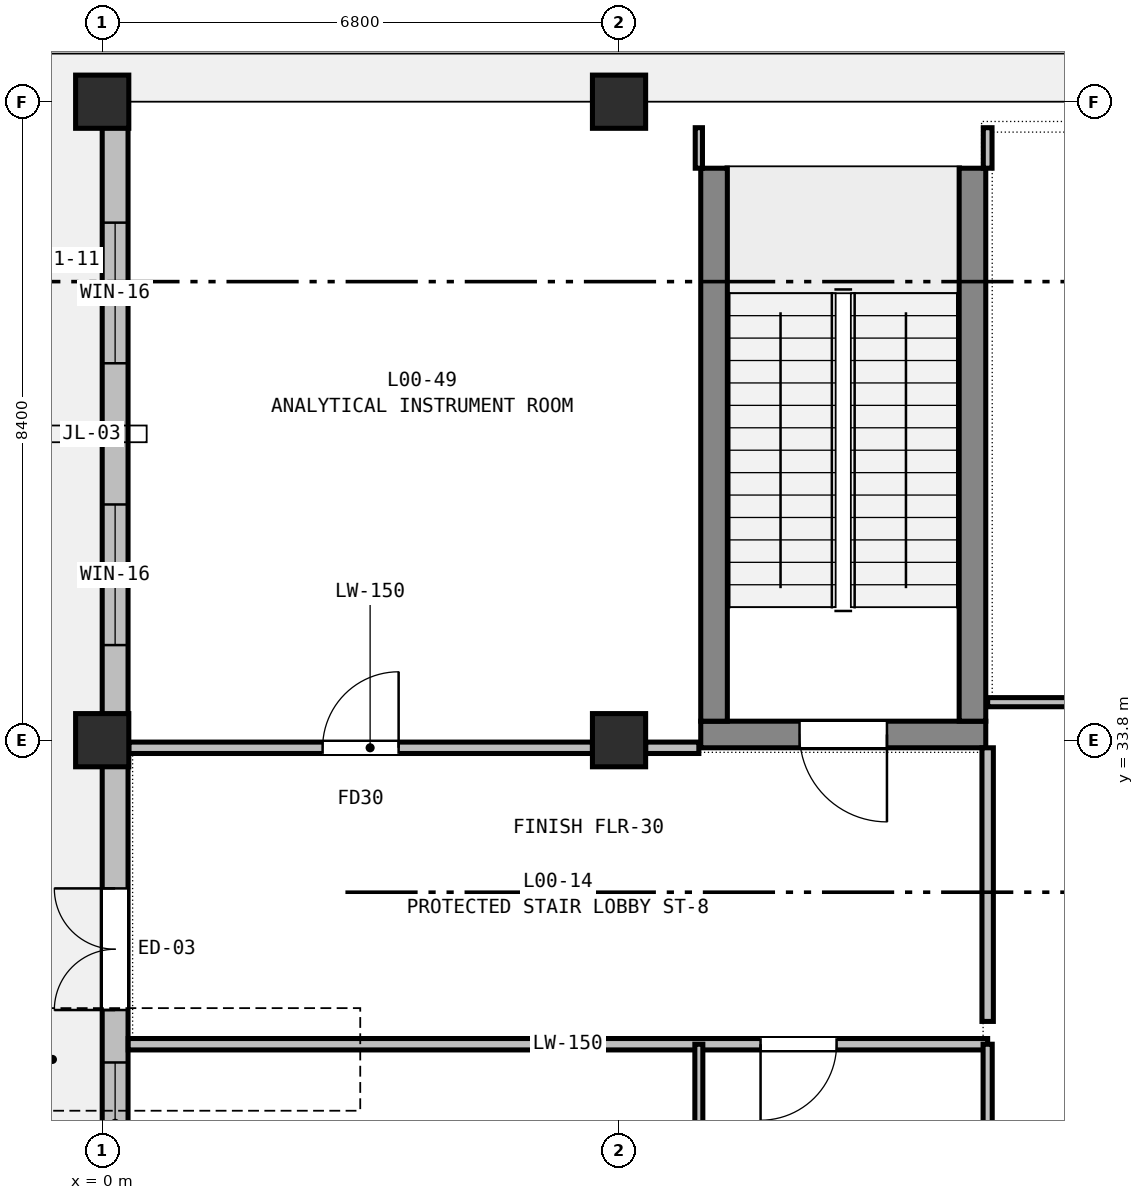
"""IFC4 building model, lengths in metres.
Left out: names, types, materials, properties, quantities, classifications, styles, units other than length and angle.
Written with IfcOpenShell. Run it as: python <this file> out.ifc"""

import sys

from ifc_helpers import new_model, si_unit, direction, frame, frame_2d, origin, origin_2d, place, context, subcontext, project, spatial, rectangle, extrude, element, fill, save


model = new_model("IFC4")
c1 = context("Model", 3, precision=1e-05, world=origin(), true_north=direction((0.0, 1.0)))
c2 = subcontext(c1, "Body", "Model", "MODEL_VIEW")
j1 = project(units=[si_unit("LENGTHUNIT", "METRE"), si_unit("PLANEANGLEUNIT", "RADIAN")], contexts=[c1])
p1 = place(None, origin())
s1 = spatial("IfcSite", under=j1, at=p1, CompositionType="ELEMENT")
p2 = place(p1, origin())
s2 = spatial("IfcBuilding", under=s1, at=p2, CompositionType="ELEMENT")
p3 = place(p2, origin())
s3 = spatial("IfcBuildingStorey", under=s2, at=p3, CompositionType="ELEMENT", Elevation=0.0)
for number, where, z_axis, x_axis in (
    (1, (0.0, 33.8, -0.32), (0.0, 0.0, 1.0), (1.0, 0.0, 0.0)),
    (2, (0.0, 42.2, -0.32), (0.0, 0.0, 1.0), (1.0, 0.0, 0.0)),
    (3, (6.8, 33.8, -0.32), (0.0, 0.0, 1.0), (1.0, 0.0, 0.0)),
    (4, (6.8, 42.2, -0.32), (0.0, 0.0, 1.0), (1.0, 0.0, 0.0)),
):
    element("IfcColumn", number, at=place(p3, frame(where, z_axis=z_axis, x_axis=x_axis)), inside=s3, PredefinedType="COLUMN", context=c2, shape_type="SweptSolid", body=[
        extrude(rectangle(XDim=0.7, YDim=0.7, at=origin_2d()), origin(), (0.0, 0.0, 1.0), 5.72),
    ])
p4 = place(p3, frame((11.625, 33.875, -0.32), z_axis=(0.0, 0.0, 1.0), x_axis=(-1.0, 0.0, 0.0)))
e5 = element("IfcWall", 5, at=p4, inside=s3, PredefinedType="SHEAR", context=c2, shape_type="SweptSolid", body=[
    extrude(rectangle(XDim=3.75, YDim=0.35, at=frame_2d((1.875, 0.0))), origin(), (0.0, 0.0, 1.0), 5.72),
])
p5 = place(p4, frame((1.3, 0.0, 0.32)))
e6 = element("IfcOpeningElement", 6, at=p5, cuts=e5, PredefinedType="OPENING", context=c2, shape_type="SweptSolid", body=[
    extrude(rectangle(XDim=1.15, YDim=2.15, at=frame_2d((0.575, 1.075))), frame((0.0, 0.185, 0.0), z_axis=(0.0, -1.0, 0.0), x_axis=(1.0, 0.0, 0.0)), (0.0, 0.0, 1.0), 0.37),
])
p6 = place(p3, frame((7.875, 41.5, -0.32), z_axis=(0.0, 0.0, 1.0), x_axis=(1.0, 0.0, 0.0)))
e7 = element("IfcWall", 7, at=p6, inside=s3, PredefinedType="SHEAR", context=c2, shape_type="SweptSolid", body=[
    extrude(rectangle(XDim=3.75, YDim=0.35, at=frame_2d((1.875, 0.0))), origin(), (0.0, 0.0, 1.0), 5.72),
])
for number, where, z_axis, x_axis in (
    (8, (8.05, 34.05, -0.32), (0.0, 0.0, 1.0), (0.0, 1.0, 0.0)),
    (9, (11.45, 34.05, -0.32), (0.0, 0.0, 1.0), (0.0, 1.0, 0.0)),
):
    element("IfcWall", number, at=place(p3, frame(where, z_axis=z_axis, x_axis=x_axis)), inside=s3, PredefinedType="SHEAR", context=c2, shape_type="SweptSolid", body=[
        extrude(rectangle(XDim=7.275, YDim=0.35, at=frame_2d((3.637, 0.0))), origin(), (0.0, 0.0, 1.0), 5.72),
    ])
p7 = place(p3, frame((0.17, 25.4, 0.0), z_axis=(0.0, 0.0, 1.0), x_axis=(0.0, 1.0, 0.0)))
e10 = element("IfcWall", 10, at=p7, inside=s3, PredefinedType="STANDARD", context=c2, shape_type="SweptSolid", body=[
    extrude(rectangle(XDim=8.4, YDim=0.34, at=frame_2d((4.2, 0.0))), origin(), (0.0, 0.0, 1.0), 4.685),
])
p8 = place(p7, frame((4.85, 0.0, 0.0)))
e11 = element("IfcOpeningElement", 11, at=p8, cuts=e10, PredefinedType="OPENING", context=c2, shape_type="SweptSolid", body=[
    extrude(rectangle(XDim=1.6, YDim=2.2, at=frame_2d((0.8, 1.1))), frame((0.0, 0.18, 0.0), z_axis=(0.0, -1.0, 0.0), x_axis=(1.0, 0.0, 0.0)), (0.0, 0.0, 1.0), 0.36),
])
p9 = place(p7, frame((2.56, 0.0, 0.9)))
e12 = element("IfcOpeningElement", 12, at=p9, cuts=e10, PredefinedType="OPENING", context=c2, shape_type="SweptSolid", body=[
    extrude(rectangle(XDim=1.6, YDim=1.6, at=frame_2d((0.8, 0.8))), frame((0.0, 0.18, 0.0), z_axis=(0.0, -1.0, 0.0), x_axis=(1.0, 0.0, 0.0)), (0.0, 0.0, 1.0), 0.36),
])
p10 = place(p3, frame((0.17, 33.8, 0.0), z_axis=(0.0, 0.0, 1.0), x_axis=(0.0, 1.0, 0.0)))
e13 = element("IfcWall", 13, at=p10, inside=s3, PredefinedType="STANDARD", context=c2, shape_type="SweptSolid", body=[
    extrude(rectangle(XDim=8.06, YDim=0.34, at=frame_2d((4.03, 0.0))), origin(), (0.0, 0.0, 1.0), 4.685),
])
p11 = place(p10, frame((1.251, 0.0, 0.9)))
e14 = element("IfcOpeningElement", 14, at=p11, cuts=e13, PredefinedType="OPENING", context=c2, shape_type="SweptSolid", body=[
    extrude(rectangle(XDim=1.85, YDim=1.6, at=frame_2d((0.925, 0.8))), frame((0.0, 0.18, 0.0), z_axis=(0.0, -1.0, 0.0), x_axis=(1.0, 0.0, 0.0)), (0.0, 0.0, 1.0), 0.36),
])
p12 = place(p10, frame((4.959, 0.0, 0.9)))
e15 = element("IfcOpeningElement", 15, at=p12, cuts=e13, PredefinedType="OPENING", context=c2, shape_type="SweptSolid", body=[
    extrude(rectangle(XDim=1.85, YDim=1.6, at=frame_2d((0.925, 0.8))), frame((0.0, 0.18, 0.0), z_axis=(0.0, -1.0, 0.0), x_axis=(1.0, 0.0, 0.0)), (0.0, 0.0, 1.0), 0.36),
])
p13 = place(p3, frame((0.0, 42.03, 0.0), z_axis=(0.0, 0.0, 1.0), x_axis=(1.0, 0.0, 0.0)))
e16 = element("IfcWall", 16, at=p13, inside=s3, PredefinedType="STANDARD", context=c2, shape_type="SweptSolid", body=[
    extrude(rectangle(XDim=6.8, YDim=0.34, at=frame_2d((3.4, 0.0))), origin(), (0.0, 0.0, 1.0), 4.535),
])
p14 = place(p13, frame((0.811, 0.0, 0.9)))
e17 = element("IfcOpeningElement", 17, at=p14, cuts=e16, PredefinedType="OPENING", context=c2, shape_type="SweptSolid", body=[
    extrude(rectangle(XDim=2.05, YDim=1.65, at=frame_2d((1.025, 0.825))), frame((0.0, 0.18, 0.0), z_axis=(0.0, -1.0, 0.0), x_axis=(1.0, 0.0, 0.0)), (0.0, 0.0, 1.0), 0.36),
])
p15 = place(p13, frame((3.939, 0.0, 0.9)))
e18 = element("IfcOpeningElement", 18, at=p15, cuts=e16, PredefinedType="OPENING", context=c2, shape_type="SweptSolid", body=[
    extrude(rectangle(XDim=2.05, YDim=1.65, at=frame_2d((1.025, 0.825))), frame((0.0, 0.18, 0.0), z_axis=(0.0, -1.0, 0.0), x_axis=(1.0, 0.0, 0.0)), (0.0, 0.0, 1.0), 0.36),
])
p16 = place(p3, frame((6.8, 42.03, 0.0), z_axis=(0.0, 0.0, 1.0), x_axis=(1.0, 0.0, 0.0)))
e19 = element("IfcWall", 19, at=p16, inside=s3, PredefinedType="STANDARD", context=c2, shape_type="SweptSolid", body=[
    extrude(rectangle(XDim=6.6, YDim=0.34, at=frame_2d((3.3, 0.0))), origin(), (0.0, 0.0, 1.0), 4.535),
])
p17 = place(p16, frame((1.29, 0.0, 0.9)))
e20 = element("IfcOpeningElement", 20, at=p17, cuts=e19, PredefinedType="OPENING", context=c2, shape_type="SweptSolid", body=[
    extrude(rectangle(XDim=2.35, YDim=1.5, at=frame_2d((1.175, 0.75))), frame((0.0, 0.18, 0.0), z_axis=(0.0, -1.0, 0.0), x_axis=(1.0, 0.0, 0.0)), (0.0, 0.0, 1.0), 0.36),
])
p18 = place(p3, frame((0.35, 33.7, 0.0), z_axis=(0.0, 0.0, 1.0), x_axis=(1.0, 0.0, 0.0)))
e21 = element("IfcWall", 21, at=p18, inside=s3, PredefinedType="PARTITIONING", context=c2, shape_type="SweptSolid", body=[
    extrude(rectangle(XDim=6.1, YDim=0.15, at=frame_2d((3.05, 0.0))), origin(), (0.0, 0.0, 1.0), 4.735),
])
p19 = place(p18, frame((2.55, 0.0, 0.0)))
e22 = element("IfcOpeningElement", 22, at=p19, cuts=e21, PredefinedType="OPENING", context=c2, shape_type="SweptSolid", body=[
    extrude(rectangle(XDim=1.0, YDim=2.1, at=frame_2d((0.5, 1.05))), frame((0.0, 0.085, 0.0), z_axis=(0.0, -1.0, 0.0), x_axis=(1.0, 0.0, 0.0)), (0.0, 0.0, 1.0), 0.17),
])
p20 = place(p3, frame((7.15, 33.7, 0.0), z_axis=(0.0, 0.0, 1.0), x_axis=(1.0, 0.0, 0.0)))
e23 = element("IfcWall", 23, at=p20, inside=s3, PredefinedType="PARTITIONING", context=c2, shape_type="SweptSolid", body=[
    extrude(rectangle(XDim=0.7, YDim=0.15, at=frame_2d((0.35, 0.0))), origin(), (0.0, 0.0, 1.0), 4.735),
])
p21 = place(p3, frame((11.65, 33.7, 0.0), z_axis=(0.0, 0.0, 1.0), x_axis=(0.0, -1.0, 0.0)))
e24 = element("IfcWall", 24, at=p21, inside=s3, PredefinedType="PARTITIONING", context=c2, shape_type="SweptSolid", body=[
    extrude(rectangle(XDim=3.6, YDim=0.15, at=frame_2d((1.8, 0.0))), origin(), (0.0, 0.0, 1.0), 4.735),
])
p22 = place(p3, frame((11.65, 29.8, 0.0), z_axis=(0.0, 0.0, 1.0), x_axis=(-1.0, 0.0, 0.0)))
e25 = element("IfcWall", 25, at=p22, inside=s3, PredefinedType="PARTITIONING", context=c2, shape_type="SweptSolid", body=[
    extrude(rectangle(XDim=11.308, YDim=0.15, at=frame_2d((5.654, 0.0))), origin(), (0.0, 0.0, 1.0), 4.535),
])
p23 = place(p22, frame((1.988, 0.0, 0.0)))
e26 = element("IfcOpeningElement", 26, at=p23, cuts=e25, PredefinedType="OPENING", context=c2, shape_type="SweptSolid", body=[
    extrude(rectangle(XDim=1.0, YDim=2.1, at=frame_2d((0.5, 1.05))), frame((0.0, 0.085, 0.0), z_axis=(0.0, -1.0, 0.0), x_axis=(1.0, 0.0, 0.0)), (0.0, 0.0, 1.0), 0.17),
])
p24 = place(p3, frame((11.65, 34.3, 0.0), z_axis=(0.0, 0.0, 1.0), x_axis=(1.0, 0.0, 0.0)))
e27 = element("IfcWall", 27, at=p24, inside=s3, PredefinedType="PARTITIONING", context=c2, shape_type="SweptSolid", body=[
    extrude(rectangle(XDim=19.55, YDim=0.12, at=frame_2d((9.775, 0.0))), origin(), (0.0, 0.0, 1.0), 4.535),
])
p25 = place(p24, frame((5.014, 0.0, 0.0)))
e28 = element("IfcOpeningElement", 28, at=p25, cuts=e27, PredefinedType="OPENING", context=c2, shape_type="SweptSolid", body=[
    extrude(rectangle(XDim=0.92, YDim=2.14, at=frame_2d((0.46, 1.07))), frame((0.0, 0.07, 0.0), z_axis=(0.0, -1.0, 0.0), x_axis=(1.0, 0.0, 0.0)), (0.0, 0.0, 1.0), 0.14),
])
p26 = place(p3, frame((11.65, 25.4, 0.0), z_axis=(0.0, 0.0, 1.0), x_axis=(0.0, 1.0, 0.0)))
e29 = element("IfcWall", 29, at=p26, inside=s3, PredefinedType="PARTITIONING", context=c2, shape_type="SweptSolid", body=[
    extrude(rectangle(XDim=4.4, YDim=0.12, at=frame_2d((2.2, 0.0))), origin(), (0.0, 0.0, 1.0), 4.735),
])
p27 = place(p3, frame((11.65, 41.325, 0.0), z_axis=(0.0, 0.0, 1.0), x_axis=(0.0, 1.0, 0.0)))
e30 = element("IfcWall", 30, at=p27, inside=s3, PredefinedType="PARTITIONING", context=c2, shape_type="SweptSolid", body=[
    extrude(rectangle(XDim=0.533, YDim=0.115, at=frame_2d((0.267, 0.0))), origin(), (0.0, 0.0, 1.0), 5.095),
])
p28 = place(p3, frame((7.85, 29.8, 0.0), z_axis=(0.0, 0.0, 1.0), x_axis=(0.0, -1.0, 0.0)))
e31 = element("IfcWall", 31, at=p28, inside=s3, PredefinedType="PARTITIONING", context=c2, shape_type="SweptSolid", body=[
    extrude(rectangle(XDim=4.4, YDim=0.105, at=frame_2d((2.2, 0.0))), origin(), (0.0, 0.0, 1.0), 4.735),
])
p29 = place(p3, frame((7.85, 41.858, 0.0), z_axis=(0.0, 0.0, 1.0), x_axis=(0.0, -1.0, 0.0)))
e32 = element("IfcWall", 32, at=p29, inside=s3, PredefinedType="PARTITIONING", context=c2, shape_type="SweptSolid", body=[
    extrude(rectangle(XDim=0.533, YDim=0.095, at=frame_2d((0.267, 0.0))), origin(), (0.0, 0.0, 1.0), 5.095),
])
p30 = place(p8, origin())
e33 = element("IfcDoor", 33, at=p30, inside=s3, OperationType="DOUBLE_DOOR_SINGLE_SWING", PredefinedType="DOOR", context=c2, shape_type="SweptSolid", body=[
    extrude(rectangle(XDim=1.6, YDim=2.2, at=frame_2d((0.8, 1.1))), frame((0.0, 0.025, 0.0), z_axis=(0.0, -1.0, 0.0), x_axis=(1.0, 0.0, 0.0)), (0.0, 0.0, 1.0), 0.05),
])
fill(e11, e33)
p31 = place(p9, origin())
e34 = element("IfcWindow", 34, at=p31, inside=s3, PartitioningType="SINGLE_PANEL", PredefinedType="WINDOW", context=c2, shape_type="SweptSolid", body=[
    extrude(rectangle(XDim=1.6, YDim=1.6, at=frame_2d((0.8, 0.8))), frame((0.0, 0.03, 0.0), z_axis=(0.0, -1.0, 0.0), x_axis=(1.0, 0.0, 0.0)), (0.0, 0.0, 1.0), 0.06),
])
fill(e12, e34)
p32 = place(p11, origin())
e35 = element("IfcWindow", 35, at=p32, inside=s3, PartitioningType="SINGLE_PANEL", PredefinedType="WINDOW", context=c2, shape_type="SweptSolid", body=[
    extrude(rectangle(XDim=1.85, YDim=1.6, at=frame_2d((0.925, 0.8))), frame((0.0, 0.03, 0.0), z_axis=(0.0, -1.0, 0.0), x_axis=(1.0, 0.0, 0.0)), (0.0, 0.0, 1.0), 0.06),
])
fill(e14, e35)
p33 = place(p12, origin())
e36 = element("IfcWindow", 36, at=p33, inside=s3, PartitioningType="SINGLE_PANEL", PredefinedType="WINDOW", context=c2, shape_type="SweptSolid", body=[
    extrude(rectangle(XDim=1.85, YDim=1.6, at=frame_2d((0.925, 0.8))), frame((0.0, 0.03, 0.0), z_axis=(0.0, -1.0, 0.0), x_axis=(1.0, 0.0, 0.0)), (0.0, 0.0, 1.0), 0.06),
])
fill(e15, e36)
p34 = place(p14, origin())
e37 = element("IfcWindow", 37, at=p34, inside=s3, PartitioningType="SINGLE_PANEL", PredefinedType="WINDOW", context=c2, shape_type="SweptSolid", body=[
    extrude(rectangle(XDim=2.05, YDim=1.65, at=frame_2d((1.025, 0.825))), frame((0.0, 0.03, 0.0), z_axis=(0.0, -1.0, 0.0), x_axis=(1.0, 0.0, 0.0)), (0.0, 0.0, 1.0), 0.06),
])
fill(e17, e37)
p35 = place(p15, origin())
e38 = element("IfcWindow", 38, at=p35, inside=s3, PartitioningType="SINGLE_PANEL", PredefinedType="WINDOW", context=c2, shape_type="SweptSolid", body=[
    extrude(rectangle(XDim=2.05, YDim=1.65, at=frame_2d((1.025, 0.825))), frame((0.0, 0.03, 0.0), z_axis=(0.0, -1.0, 0.0), x_axis=(1.0, 0.0, 0.0)), (0.0, 0.0, 1.0), 0.06),
])
fill(e18, e38)
p36 = place(p17, origin())
e39 = element("IfcWindow", 39, at=p36, inside=s3, PartitioningType="SINGLE_PANEL", PredefinedType="WINDOW", context=c2, shape_type="SweptSolid", body=[
    extrude(rectangle(XDim=2.35, YDim=1.5, at=frame_2d((1.175, 0.75))), frame((0.0, 0.03, 0.0), z_axis=(0.0, -1.0, 0.0), x_axis=(1.0, 0.0, 0.0)), (0.0, 0.0, 1.0), 0.06),
])
fill(e20, e39)
p37 = place(p5, origin())
e40 = element("IfcDoor", 40, at=p37, inside=s3, OperationType="SINGLE_SWING_LEFT", PredefinedType="DOOR", context=c2, shape_type="SweptSolid", body=[
    extrude(rectangle(XDim=1.15, YDim=2.15, at=frame_2d((0.575, 1.075))), frame((0.0, 0.025, 0.0), z_axis=(0.0, -1.0, 0.0), x_axis=(1.0, 0.0, 0.0)), (0.0, 0.0, 1.0), 0.05),
])
fill(e6, e40)
p38 = place(p23, origin())
e41 = element("IfcDoor", 41, at=p38, inside=s3, OperationType="SINGLE_SWING_RIGHT", PredefinedType="DOOR", context=c2, shape_type="SweptSolid", body=[
    extrude(rectangle(XDim=1.0, YDim=2.1, at=frame_2d((0.5, 1.05))), frame((0.0, 0.025, 0.0), z_axis=(0.0, -1.0, 0.0), x_axis=(1.0, 0.0, 0.0)), (0.0, 0.0, 1.0), 0.05),
])
fill(e26, e41)
p39 = place(p19, origin())
e42 = element("IfcDoor", 42, at=p39, inside=s3, OperationType="SINGLE_SWING_RIGHT", PredefinedType="DOOR", context=c2, shape_type="SweptSolid", body=[
    extrude(rectangle(XDim=1.0, YDim=2.1, at=frame_2d((0.5, 1.05))), frame((0.0, 0.025, 0.0), z_axis=(0.0, -1.0, 0.0), x_axis=(1.0, 0.0, 0.0)), (0.0, 0.0, 1.0), 0.05),
])
fill(e22, e42)
save(model, sys.argv[1])
